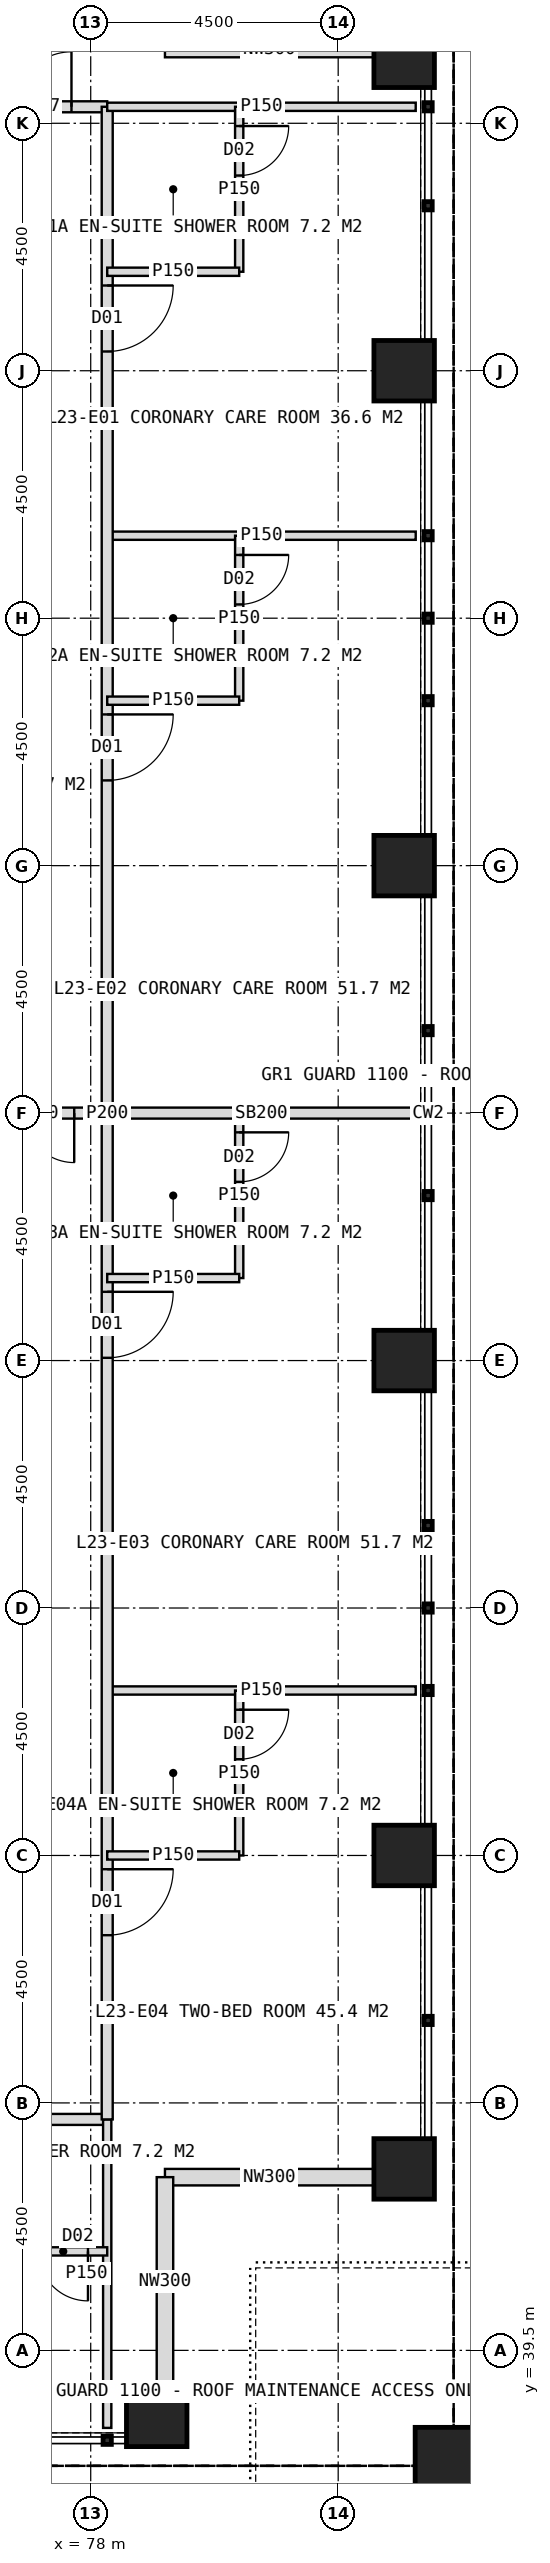
"""IFC4 building model, lengths in metres.
Left out: names, types, materials, properties, quantities, classifications, styles, units other than length and angle.
Written with IfcOpenShell. Run it as: python <this file> out.ifc"""

import sys

from ifc_helpers import new_model, si_unit, direction, frame, frame_2d, origin, origin_2d, place, context, subcontext, project, spatial, rectangle, hollow_rectangle, extrude, element, fill, save


model = new_model("IFC4")
c1 = context("Model", 3, precision=1e-05, world=origin(), true_north=direction((0.0, 1.0)))
c2 = subcontext(c1, "Body", "Model", "MODEL_VIEW")
j1 = project(units=[si_unit("LENGTHUNIT", "METRE"), si_unit("PLANEANGLEUNIT", "RADIAN")], contexts=[c1])
p1 = place(None, origin())
s1 = spatial("IfcSite", under=j1, at=p1, CompositionType="ELEMENT")
p2 = place(p1, origin())
s2 = spatial("IfcBuilding", under=s1, at=p2, CompositionType="ELEMENT")
p3 = place(p2, frame((0.0, 0.0, 100.0)))
s3 = spatial("IfcBuildingStorey", under=s2, at=p3, CompositionType="ELEMENT", Elevation=100.0)
for number, where, z_axis, x_axis in (
    (1, (83.7, 42.8, 0.0), (0.0, 0.0, 1.0), (1.0, 0.0, 0.0)),
    (2, (83.7, 48.5, 0.0), (0.0, 0.0, 1.0), (1.0, 0.0, 0.0)),
    (3, (83.7, 57.5, 0.0), (0.0, 0.0, 1.0), (1.0, 0.0, 0.0)),
    (4, (83.7, 66.5, 0.0), (0.0, 0.0, 1.0), (1.0, 0.0, 0.0)),
    (5, (83.7, 75.5, 0.0), (0.0, 0.0, 1.0), (1.0, 0.0, 0.0)),
    (6, (79.2, 38.3, 0.0), (0.0, 0.0, 1.0), (1.0, 0.0, 0.0)),
    (7, (83.7, 81.2, 0.0), (0.0, 0.0, 1.0), (1.0, 0.0, 0.0)),
):
    element("IfcColumn", number, at=place(p3, frame(where, z_axis=z_axis, x_axis=x_axis)), inside=s3, PredefinedType="COLUMN", context=c2, shape_type="SweptSolid", body=[
        extrude(hollow_rectangle(XDim=1.1, YDim=1.1, WallThickness=0.1, at=origin_2d()), origin(), (0.0, 0.0, 1.0), 4.0),
    ])
p4 = place(p3, frame((84.6, 37.4, 2.0), z_axis=(0.0, 0.0, 1.0), x_axis=(1.0, 0.0, 0.0)))
e8 = element("IfcColumn", 8, at=p4, inside=s3, PredefinedType="COLUMN", context=c2, shape_type="SweptSolid", body=[
    extrude(hollow_rectangle(XDim=1.4, YDim=1.4, WallThickness=0.08, at=origin_2d()), origin(), (0.0, 0.0, 1.0), 2.0),
])
for number, where, z_axis, x_axis in (
    (9, (79.35, 81.35, 0.0), (0.0, 0.0, 1.0), (1.0, 0.0, 0.0)),
    (10, (83.15, 42.65, 0.0), (0.0, 0.0, 1.0), (-1.0, 0.0, 0.0)),
    (11, (79.35, 42.65, 0.0), (0.0, 0.0, 1.0), (0.0, -1.0, 0.0)),
):
    element("IfcWall", number, at=place(p3, frame(where, z_axis=z_axis, x_axis=x_axis)), inside=s3, PredefinedType="ELEMENTEDWALL", context=c2, shape_type="SweptSolid", body=[
        extrude(rectangle(XDim=3.8, YDim=0.3, at=frame_2d((1.9, 0.0))), origin(), (0.0, 0.0, 1.0), 4.0),
    ])
p5 = place(p3, frame((41.7, 80.3, 0.0), z_axis=(0.0, 0.0, 1.0), x_axis=(1.0, 0.0, 0.0)))
e12 = element("IfcWall", 12, at=p5, inside=s3, PredefinedType="PARTITIONING", context=c2, shape_type="SweptSolid", body=[
    extrude(rectangle(XDim=36.6, YDim=0.2, at=frame_2d((18.3, 0.0))), origin(), (0.0, 0.0, 1.0), 3.75),
])
p6 = place(p5, frame((3.25, 0.0, 0.0)))
e13 = element("IfcOpeningElement", 13, at=p6, cuts=e12, PredefinedType="OPENING", context=c2, shape_type="SweptSolid", body=[
    extrude(rectangle(XDim=1.2, YDim=2.2, at=frame_2d((0.6, 1.1))), frame((0.0, 0.11, 0.0), z_axis=(0.0, -1.0, 0.0), x_axis=(1.0, 0.0, 0.0)), (0.0, 0.0, 1.0), 0.22),
])
p7 = place(p5, frame((11.05, 0.0, 0.0)))
e14 = element("IfcOpeningElement", 14, at=p7, cuts=e12, PredefinedType="OPENING", context=c2, shape_type="SweptSolid", body=[
    extrude(rectangle(XDim=1.2, YDim=2.2, at=frame_2d((0.6, 1.1))), frame((0.0, 0.11, 0.0), z_axis=(0.0, -1.0, 0.0), x_axis=(1.0, 0.0, 0.0)), (0.0, 0.0, 1.0), 0.22),
])
p8 = place(p5, frame((20.05, 0.0, 0.0)))
e15 = element("IfcOpeningElement", 15, at=p8, cuts=e12, PredefinedType="OPENING", context=c2, shape_type="SweptSolid", body=[
    extrude(rectangle(XDim=1.2, YDim=2.2, at=frame_2d((0.6, 1.1))), frame((0.0, 0.11, 0.0), z_axis=(0.0, -1.0, 0.0), x_axis=(1.0, 0.0, 0.0)), (0.0, 0.0, 1.0), 0.22),
])
p9 = place(p5, frame((29.05, 0.0, 0.0)))
e16 = element("IfcOpeningElement", 16, at=p9, cuts=e12, PredefinedType="OPENING", context=c2, shape_type="SweptSolid", body=[
    extrude(rectangle(XDim=1.2, YDim=2.2, at=frame_2d((0.6, 1.1))), frame((0.0, 0.11, 0.0), z_axis=(0.0, -1.0, 0.0), x_axis=(1.0, 0.0, 0.0)), (0.0, 0.0, 1.0), 0.22),
])
p10 = place(p5, frame((34.95, 0.0, 0.0)))
e17 = element("IfcOpeningElement", 17, at=p10, cuts=e12, PredefinedType="OPENING", context=c2, shape_type="SweptSolid", body=[
    extrude(rectangle(XDim=1.0, YDim=2.1, at=frame_2d((0.5, 1.05))), frame((0.0, 0.11, 0.0), z_axis=(0.0, -1.0, 0.0), x_axis=(1.0, 0.0, 0.0)), (0.0, 0.0, 1.0), 0.22),
])
p11 = place(p3, frame((78.3, 43.7, 0.0), z_axis=(0.0, 0.0, 1.0), x_axis=(-1.0, 0.0, 0.0)))
e18 = element("IfcWall", 18, at=p11, inside=s3, PredefinedType="PARTITIONING", context=c2, shape_type="SweptSolid", body=[
    extrude(rectangle(XDim=36.6, YDim=0.2, at=frame_2d((18.3, 0.0))), origin(), (0.0, 0.0, 1.0), 3.75),
])
p12 = place(p11, frame((3.25, 0.0, 0.0)))
e19 = element("IfcOpeningElement", 19, at=p12, cuts=e18, PredefinedType="OPENING", context=c2, shape_type="SweptSolid", body=[
    extrude(rectangle(XDim=1.2, YDim=2.2, at=frame_2d((0.6, 1.1))), frame((0.0, 0.11, 0.0), z_axis=(0.0, -1.0, 0.0), x_axis=(1.0, 0.0, 0.0)), (0.0, 0.0, 1.0), 0.22),
])
p13 = place(p11, frame((11.05, 0.0, 0.0)))
e20 = element("IfcOpeningElement", 20, at=p13, cuts=e18, PredefinedType="OPENING", context=c2, shape_type="SweptSolid", body=[
    extrude(rectangle(XDim=1.2, YDim=2.2, at=frame_2d((0.6, 1.1))), frame((0.0, 0.11, 0.0), z_axis=(0.0, -1.0, 0.0), x_axis=(1.0, 0.0, 0.0)), (0.0, 0.0, 1.0), 0.22),
])
p14 = place(p11, frame((20.05, 0.0, 0.0)))
e21 = element("IfcOpeningElement", 21, at=p14, cuts=e18, PredefinedType="OPENING", context=c2, shape_type="SweptSolid", body=[
    extrude(rectangle(XDim=1.2, YDim=2.2, at=frame_2d((0.6, 1.1))), frame((0.0, 0.11, 0.0), z_axis=(0.0, -1.0, 0.0), x_axis=(1.0, 0.0, 0.0)), (0.0, 0.0, 1.0), 0.22),
])
p15 = place(p11, frame((28.45, 0.0, 0.0)))
e22 = element("IfcOpeningElement", 22, at=p15, cuts=e18, PredefinedType="OPENING", context=c2, shape_type="SweptSolid", body=[
    extrude(rectangle(XDim=1.2, YDim=2.2, at=frame_2d((0.6, 1.1))), frame((0.0, 0.11, 0.0), z_axis=(0.0, -1.0, 0.0), x_axis=(1.0, 0.0, 0.0)), (0.0, 0.0, 1.0), 0.22),
])
p16 = place(p3, frame((78.3, 43.7, 0.0), z_axis=(0.0, 0.0, 1.0), x_axis=(0.0, -1.0, 0.0)))
e23 = element("IfcWall", 23, at=p16, inside=s3, PredefinedType="PARTITIONING", context=c2, shape_type="SweptSolid", body=[
    extrude(rectangle(XDim=5.61, YDim=0.15, at=frame_2d((2.805, 0.0))), origin(), (0.0, 0.0, 1.0), 3.75),
])
p17 = place(p3, frame((78.3, 41.3, 0.0), z_axis=(0.0, 0.0, 1.0), x_axis=(-1.0, 0.0, 0.0)))
e24 = element("IfcWall", 24, at=p17, inside=s3, PredefinedType="PARTITIONING", context=c2, shape_type="SweptSolid", body=[
    extrude(rectangle(XDim=3.0, YDim=0.15, at=frame_2d((1.5, 0.0))), origin(), (0.0, 0.0, 1.0), 3.75),
])
p18 = place(p17, frame((0.35, 0.0, 0.0)))
e25 = element("IfcOpeningElement", 25, at=p18, cuts=e24, PredefinedType="OPENING", context=c2, shape_type="SweptSolid", body=[
    extrude(rectangle(XDim=0.9, YDim=2.1, at=frame_2d((0.45, 1.05))), frame((0.0, 0.085, 0.0), z_axis=(0.0, -1.0, 0.0), x_axis=(1.0, 0.0, 0.0)), (0.0, 0.0, 1.0), 0.17),
])
p19 = place(p3, frame((78.3, 72.5, 0.0), z_axis=(0.0, 0.0, 1.0), x_axis=(1.0, 0.0, 0.0)))
e26 = element("IfcWall", 26, at=p19, inside=s3, PredefinedType="PARTITIONING", context=c2, shape_type="SweptSolid", body=[
    extrude(rectangle(XDim=5.61, YDim=0.15, at=frame_2d((2.805, 0.0))), origin(), (0.0, 0.0, 1.0), 3.75),
])
p20 = place(p3, frame((78.3, 62.0, 0.0), z_axis=(0.0, 0.0, 1.0), x_axis=(1.0, 0.0, 0.0)))
e27 = element("IfcWall", 27, at=p20, inside=s3, PredefinedType="SOLIDWALL", context=c2, shape_type="SweptSolid", body=[
    extrude(rectangle(XDim=5.61, YDim=0.2, at=frame_2d((2.805, 0.0))), origin(), (0.0, 0.0, 1.0), 2.95),
])
p21 = place(p3, frame((78.3, 51.5, 0.0), z_axis=(0.0, 0.0, 1.0), x_axis=(1.0, 0.0, 0.0)))
e28 = element("IfcWall", 28, at=p21, inside=s3, PredefinedType="PARTITIONING", context=c2, shape_type="SweptSolid", body=[
    extrude(rectangle(XDim=5.61, YDim=0.15, at=frame_2d((2.805, 0.0))), origin(), (0.0, 0.0, 1.0), 3.75),
])
p22 = place(p3, frame((78.3, 80.3, 0.0), z_axis=(0.0, 0.0, 1.0), x_axis=(0.0, -1.0, 0.0)))
e29 = element("IfcWall", 29, at=p22, inside=s3, PredefinedType="PARTITIONING", context=c2, shape_type="SweptSolid", body=[
    extrude(rectangle(XDim=36.6, YDim=0.2, at=frame_2d((18.3, 0.0))), origin(), (0.0, 0.0, 1.0), 3.75),
])
p23 = place(p22, frame((3.25, 0.0, 0.0)))
e30 = element("IfcOpeningElement", 30, at=p23, cuts=e29, PredefinedType="OPENING", context=c2, shape_type="SweptSolid", body=[
    extrude(rectangle(XDim=1.2, YDim=2.2, at=frame_2d((0.6, 1.1))), frame((0.0, 0.11, 0.0), z_axis=(0.0, -1.0, 0.0), x_axis=(1.0, 0.0, 0.0)), (0.0, 0.0, 1.0), 0.22),
])
p24 = place(p22, frame((11.05, 0.0, 0.0)))
e31 = element("IfcOpeningElement", 31, at=p24, cuts=e29, PredefinedType="OPENING", context=c2, shape_type="SweptSolid", body=[
    extrude(rectangle(XDim=1.2, YDim=2.2, at=frame_2d((0.6, 1.1))), frame((0.0, 0.11, 0.0), z_axis=(0.0, -1.0, 0.0), x_axis=(1.0, 0.0, 0.0)), (0.0, 0.0, 1.0), 0.22),
])
p25 = place(p22, frame((21.55, 0.0, 0.0)))
e32 = element("IfcOpeningElement", 32, at=p25, cuts=e29, PredefinedType="OPENING", context=c2, shape_type="SweptSolid", body=[
    extrude(rectangle(XDim=1.2, YDim=2.2, at=frame_2d((0.6, 1.1))), frame((0.0, 0.11, 0.0), z_axis=(0.0, -1.0, 0.0), x_axis=(1.0, 0.0, 0.0)), (0.0, 0.0, 1.0), 0.22),
])
p26 = place(p22, frame((32.05, 0.0, 0.0)))
e33 = element("IfcOpeningElement", 33, at=p26, cuts=e29, PredefinedType="OPENING", context=c2, shape_type="SweptSolid", body=[
    extrude(rectangle(XDim=1.2, YDim=2.2, at=frame_2d((0.6, 1.1))), frame((0.0, 0.11, 0.0), z_axis=(0.0, -1.0, 0.0), x_axis=(1.0, 0.0, 0.0)), (0.0, 0.0, 1.0), 0.22),
])
p27 = place(p3, frame((78.3, 80.3, 0.0), z_axis=(0.0, 0.0, 1.0), x_axis=(1.0, 0.0, 0.0)))
e34 = element("IfcWall", 34, at=p27, inside=s3, PredefinedType="PARTITIONING", context=c2, shape_type="SweptSolid", body=[
    extrude(rectangle(XDim=5.61, YDim=0.15, at=frame_2d((2.805, 0.0))), origin(), (0.0, 0.0, 1.0), 3.75),
])
p28 = place(p3, frame((80.7, 80.3, 0.0), z_axis=(0.0, 0.0, 1.0), x_axis=(0.0, -1.0, 0.0)))
e35 = element("IfcWall", 35, at=p28, inside=s3, PredefinedType="PARTITIONING", context=c2, shape_type="SweptSolid", body=[
    extrude(rectangle(XDim=3.0, YDim=0.15, at=frame_2d((1.5, 0.0))), origin(), (0.0, 0.0, 1.0), 3.75),
])
p29 = place(p28, frame((0.35, 0.0, 0.0)))
e36 = element("IfcOpeningElement", 36, at=p29, cuts=e35, PredefinedType="OPENING", context=c2, shape_type="SweptSolid", body=[
    extrude(rectangle(XDim=0.9, YDim=2.1, at=frame_2d((0.45, 1.05))), frame((0.0, 0.085, 0.0), z_axis=(0.0, -1.0, 0.0), x_axis=(1.0, 0.0, 0.0)), (0.0, 0.0, 1.0), 0.17),
])
p30 = place(p3, frame((78.3, 77.3, 0.0), z_axis=(0.0, 0.0, 1.0), x_axis=(1.0, 0.0, 0.0)))
e37 = element("IfcWall", 37, at=p30, inside=s3, PredefinedType="PARTITIONING", context=c2, shape_type="SweptSolid", body=[
    extrude(rectangle(XDim=2.4, YDim=0.15, at=frame_2d((1.2, 0.0))), origin(), (0.0, 0.0, 1.0), 3.75),
])
p31 = place(p3, frame((80.7, 72.5, 0.0), z_axis=(0.0, 0.0, 1.0), x_axis=(0.0, -1.0, 0.0)))
e38 = element("IfcWall", 38, at=p31, inside=s3, PredefinedType="PARTITIONING", context=c2, shape_type="SweptSolid", body=[
    extrude(rectangle(XDim=3.0, YDim=0.15, at=frame_2d((1.5, 0.0))), origin(), (0.0, 0.0, 1.0), 3.75),
])
p32 = place(p31, frame((0.35, 0.0, 0.0)))
e39 = element("IfcOpeningElement", 39, at=p32, cuts=e38, PredefinedType="OPENING", context=c2, shape_type="SweptSolid", body=[
    extrude(rectangle(XDim=0.9, YDim=2.1, at=frame_2d((0.45, 1.05))), frame((0.0, 0.085, 0.0), z_axis=(0.0, -1.0, 0.0), x_axis=(1.0, 0.0, 0.0)), (0.0, 0.0, 1.0), 0.17),
])
p33 = place(p3, frame((78.3, 69.5, 0.0), z_axis=(0.0, 0.0, 1.0), x_axis=(1.0, 0.0, 0.0)))
e40 = element("IfcWall", 40, at=p33, inside=s3, PredefinedType="PARTITIONING", context=c2, shape_type="SweptSolid", body=[
    extrude(rectangle(XDim=2.4, YDim=0.15, at=frame_2d((1.2, 0.0))), origin(), (0.0, 0.0, 1.0), 3.75),
])
p34 = place(p3, frame((80.7, 62.0, 0.0), z_axis=(0.0, 0.0, 1.0), x_axis=(0.0, -1.0, 0.0)))
e41 = element("IfcWall", 41, at=p34, inside=s3, PredefinedType="PARTITIONING", context=c2, shape_type="SweptSolid", body=[
    extrude(rectangle(XDim=3.0, YDim=0.15, at=frame_2d((1.5, 0.0))), origin(), (0.0, 0.0, 1.0), 3.75),
])
p35 = place(p34, frame((0.35, 0.0, 0.0)))
e42 = element("IfcOpeningElement", 42, at=p35, cuts=e41, PredefinedType="OPENING", context=c2, shape_type="SweptSolid", body=[
    extrude(rectangle(XDim=0.9, YDim=2.1, at=frame_2d((0.45, 1.05))), frame((0.0, 0.085, 0.0), z_axis=(0.0, -1.0, 0.0), x_axis=(1.0, 0.0, 0.0)), (0.0, 0.0, 1.0), 0.17),
])
p36 = place(p3, frame((78.3, 59.0, 0.0), z_axis=(0.0, 0.0, 1.0), x_axis=(1.0, 0.0, 0.0)))
e43 = element("IfcWall", 43, at=p36, inside=s3, PredefinedType="PARTITIONING", context=c2, shape_type="SweptSolid", body=[
    extrude(rectangle(XDim=2.4, YDim=0.15, at=frame_2d((1.2, 0.0))), origin(), (0.0, 0.0, 1.0), 3.75),
])
p37 = place(p3, frame((80.7, 51.5, 0.0), z_axis=(0.0, 0.0, 1.0), x_axis=(0.0, -1.0, 0.0)))
e44 = element("IfcWall", 44, at=p37, inside=s3, PredefinedType="PARTITIONING", context=c2, shape_type="SweptSolid", body=[
    extrude(rectangle(XDim=3.0, YDim=0.15, at=frame_2d((1.5, 0.0))), origin(), (0.0, 0.0, 1.0), 3.75),
])
p38 = place(p37, frame((0.35, 0.0, 0.0)))
e45 = element("IfcOpeningElement", 45, at=p38, cuts=e44, PredefinedType="OPENING", context=c2, shape_type="SweptSolid", body=[
    extrude(rectangle(XDim=0.9, YDim=2.1, at=frame_2d((0.45, 1.05))), frame((0.0, 0.085, 0.0), z_axis=(0.0, -1.0, 0.0), x_axis=(1.0, 0.0, 0.0)), (0.0, 0.0, 1.0), 0.17),
])
p39 = place(p3, frame((78.3, 48.5, 0.0), z_axis=(0.0, 0.0, 1.0), x_axis=(1.0, 0.0, 0.0)))
e46 = element("IfcWall", 46, at=p39, inside=s3, PredefinedType="PARTITIONING", context=c2, shape_type="SweptSolid", body=[
    extrude(rectangle(XDim=2.4, YDim=0.15, at=frame_2d((1.2, 0.0))), origin(), (0.0, 0.0, 1.0), 2.95),
])
p40 = place(p3, frame((75.6, 62.0, 0.0), z_axis=(0.0, 0.0, 1.0), x_axis=(1.0, 0.0, 0.0)))
e47 = element("IfcWall", 47, at=p40, inside=s3, PredefinedType="SOLIDWALL", context=c2, shape_type="SweptSolid", body=[
    extrude(rectangle(XDim=2.7, YDim=0.2, at=frame_2d((1.35, 0.0))), origin(), (0.0, 0.0, 1.0), 2.95),
])
p41 = place(p40, frame((0.3, 0.0, 0.0)))
e48 = element("IfcOpeningElement", 48, at=p41, cuts=e47, PredefinedType="OPENING", context=c2, shape_type="SweptSolid", body=[
    extrude(rectangle(XDim=1.8, YDim=2.2, at=frame_2d((0.9, 1.1))), frame((0.0, 0.11, 0.0), z_axis=(0.0, -1.0, 0.0), x_axis=(1.0, 0.0, 0.0)), (0.0, 0.0, 1.0), 0.22),
])
p42 = place(p10, origin())
e49 = element("IfcDoor", 49, at=p42, inside=s3, OperationType="SINGLE_SWING_RIGHT", PredefinedType="DOOR", context=c2, shape_type="SweptSolid", body=[
    extrude(rectangle(XDim=1.0, YDim=2.1, at=frame_2d((0.5, 1.05))), frame((0.0, 0.025, 0.0), z_axis=(0.0, -1.0, 0.0), x_axis=(1.0, 0.0, 0.0)), (0.0, 0.0, 1.0), 0.05),
])
fill(e17, e49)
p43 = place(p18, origin())
e50 = element("IfcDoor", 50, at=p43, inside=s3, OperationType="SINGLE_SWING_LEFT", PredefinedType="DOOR", context=c2, shape_type="SweptSolid", body=[
    extrude(rectangle(XDim=0.9, YDim=2.1, at=frame_2d((0.45, 1.05))), frame((0.0, 0.025, 0.0), z_axis=(0.0, -1.0, 0.0), x_axis=(1.0, 0.0, 0.0)), (0.0, 0.0, 1.0), 0.05),
])
fill(e25, e50)
p44 = place(p23, origin())
e51 = element("IfcDoor", 51, at=p44, inside=s3, OperationType="SINGLE_SWING_LEFT", PredefinedType="DOOR", context=c2, shape_type="SweptSolid", body=[
    extrude(rectangle(XDim=1.2, YDim=2.2, at=frame_2d((0.6, 1.1))), frame((0.0, 0.025, 0.0), z_axis=(0.0, -1.0, 0.0), x_axis=(1.0, 0.0, 0.0)), (0.0, 0.0, 1.0), 0.05),
])
fill(e30, e51)
p45 = place(p29, origin())
e52 = element("IfcDoor", 52, at=p45, inside=s3, OperationType="SINGLE_SWING_LEFT", PredefinedType="DOOR", context=c2, shape_type="SweptSolid", body=[
    extrude(rectangle(XDim=0.9, YDim=2.1, at=frame_2d((0.45, 1.05))), frame((0.0, 0.025, 0.0), z_axis=(0.0, -1.0, 0.0), x_axis=(1.0, 0.0, 0.0)), (0.0, 0.0, 1.0), 0.05),
])
fill(e36, e52)
p46 = place(p24, origin())
e53 = element("IfcDoor", 53, at=p46, inside=s3, OperationType="SINGLE_SWING_LEFT", PredefinedType="DOOR", context=c2, shape_type="SweptSolid", body=[
    extrude(rectangle(XDim=1.2, YDim=2.2, at=frame_2d((0.6, 1.1))), frame((0.0, 0.025, 0.0), z_axis=(0.0, -1.0, 0.0), x_axis=(1.0, 0.0, 0.0)), (0.0, 0.0, 1.0), 0.05),
])
fill(e31, e53)
p47 = place(p32, origin())
e54 = element("IfcDoor", 54, at=p47, inside=s3, OperationType="SINGLE_SWING_LEFT", PredefinedType="DOOR", context=c2, shape_type="SweptSolid", body=[
    extrude(rectangle(XDim=0.9, YDim=2.1, at=frame_2d((0.45, 1.05))), frame((0.0, 0.025, 0.0), z_axis=(0.0, -1.0, 0.0), x_axis=(1.0, 0.0, 0.0)), (0.0, 0.0, 1.0), 0.05),
])
fill(e39, e54)
p48 = place(p25, origin())
e55 = element("IfcDoor", 55, at=p48, inside=s3, OperationType="SINGLE_SWING_LEFT", PredefinedType="DOOR", context=c2, shape_type="SweptSolid", body=[
    extrude(rectangle(XDim=1.2, YDim=2.2, at=frame_2d((0.6, 1.1))), frame((0.0, 0.025, 0.0), z_axis=(0.0, -1.0, 0.0), x_axis=(1.0, 0.0, 0.0)), (0.0, 0.0, 1.0), 0.05),
])
fill(e32, e55)
p49 = place(p35, origin())
e56 = element("IfcDoor", 56, at=p49, inside=s3, OperationType="SINGLE_SWING_LEFT", PredefinedType="DOOR", context=c2, shape_type="SweptSolid", body=[
    extrude(rectangle(XDim=0.9, YDim=2.1, at=frame_2d((0.45, 1.05))), frame((0.0, 0.025, 0.0), z_axis=(0.0, -1.0, 0.0), x_axis=(1.0, 0.0, 0.0)), (0.0, 0.0, 1.0), 0.05),
])
fill(e42, e56)
p50 = place(p26, origin())
e57 = element("IfcDoor", 57, at=p50, inside=s3, OperationType="SINGLE_SWING_LEFT", PredefinedType="DOOR", context=c2, shape_type="SweptSolid", body=[
    extrude(rectangle(XDim=1.2, YDim=2.2, at=frame_2d((0.6, 1.1))), frame((0.0, 0.025, 0.0), z_axis=(0.0, -1.0, 0.0), x_axis=(1.0, 0.0, 0.0)), (0.0, 0.0, 1.0), 0.05),
])
fill(e33, e57)
p51 = place(p38, origin())
e58 = element("IfcDoor", 58, at=p51, inside=s3, OperationType="SINGLE_SWING_LEFT", PredefinedType="DOOR", context=c2, shape_type="SweptSolid", body=[
    extrude(rectangle(XDim=0.9, YDim=2.1, at=frame_2d((0.45, 1.05))), frame((0.0, 0.025, 0.0), z_axis=(0.0, -1.0, 0.0), x_axis=(1.0, 0.0, 0.0)), (0.0, 0.0, 1.0), 0.05),
])
fill(e45, e58)
p52 = place(p41, origin())
e59 = element("IfcDoor", 59, at=p52, inside=s3, OperationType="DOUBLE_DOOR_DOUBLE_SWING", PredefinedType="DOOR", context=c2, shape_type="SweptSolid", body=[
    extrude(rectangle(XDim=1.8, YDim=2.2, at=frame_2d((0.9, 1.1))), frame((0.0, 0.025, 0.0), z_axis=(0.0, -1.0, 0.0), x_axis=(1.0, 0.0, 0.0)), (0.0, 0.0, 1.0), 0.05),
])
fill(e48, e59)
save(model, sys.argv[1])
